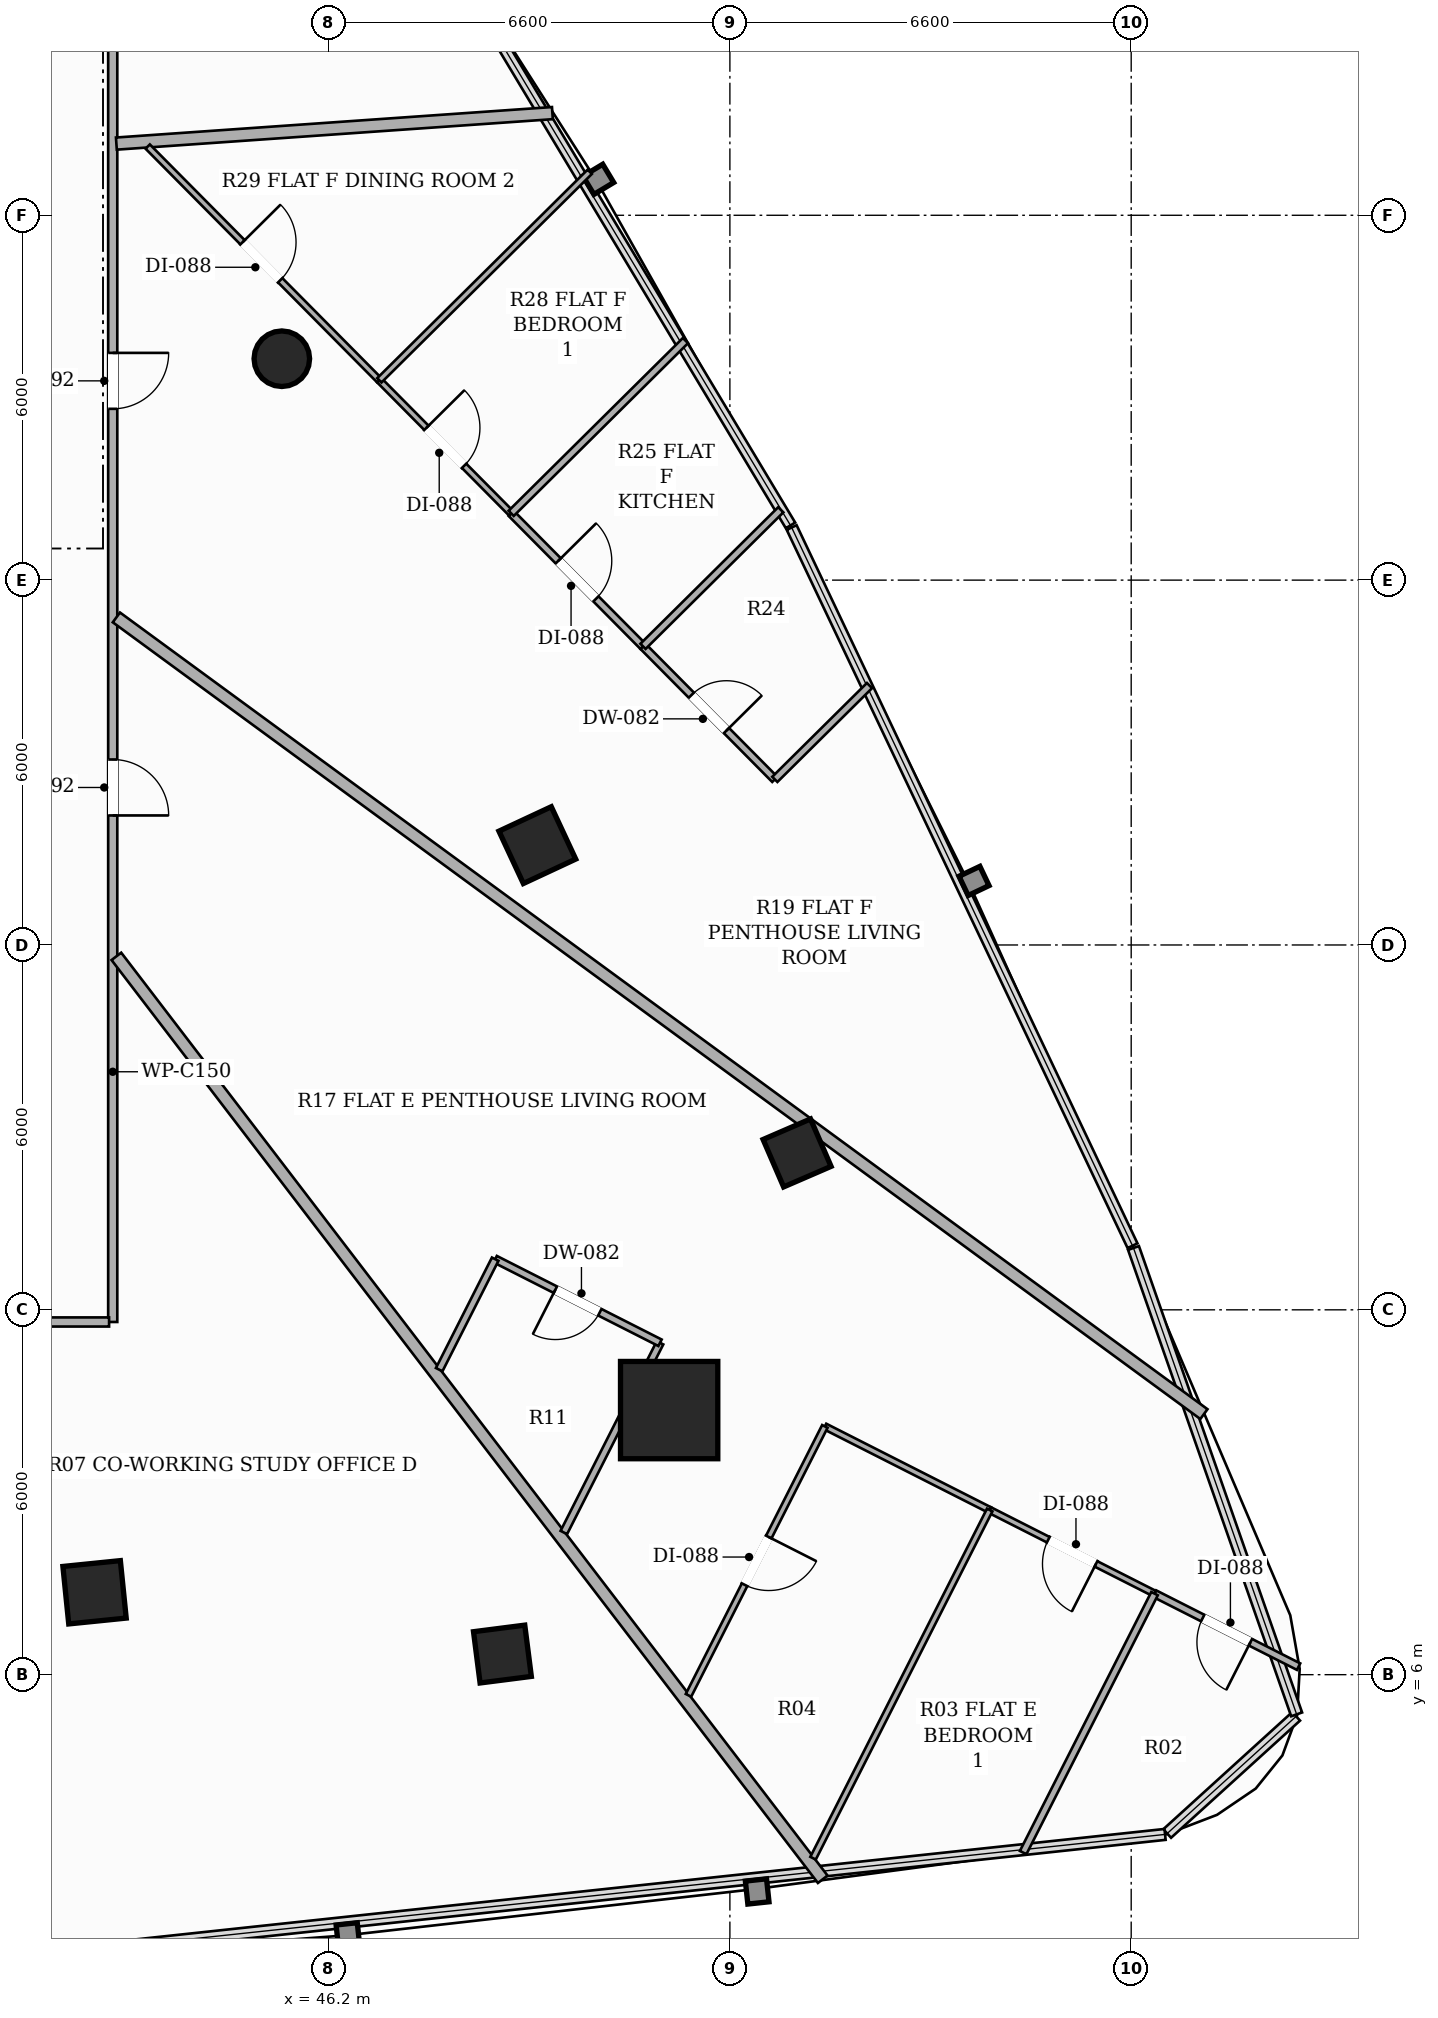
"""IFC4 building model, lengths in metres.
Left out: names, types, materials, properties, quantities, classifications, styles, units other than length and angle.
Written with IfcOpenShell. Run it as: python <this file> out.ifc"""

import sys

from ifc_helpers import new_model, si_unit, direction, frame, frame_2d, origin, origin_2d, place, context, subcontext, project, spatial, rectangle, hollow_rectangle, hollow_circle, extrude, element, fill, save


model = new_model("IFC4")
c1 = context("Model", 3, precision=1e-05, world=origin(), true_north=direction((0.0, 1.0)))
c2 = subcontext(c1, "Body", "Model", "MODEL_VIEW")
j1 = project(units=[si_unit("LENGTHUNIT", "METRE"), si_unit("PLANEANGLEUNIT", "RADIAN")], contexts=[c1])
p1 = place(None, origin())
s1 = spatial("IfcSite", under=j1, at=p1, CompositionType="ELEMENT")
p2 = place(p1, origin())
s2 = spatial("IfcBuilding", under=s1, at=p2, CompositionType="ELEMENT")
p3 = place(p2, frame((0.0, 0.0, 30.2)))
s3 = spatial("IfcBuildingStorey", under=s2, at=p3, CompositionType="ELEMENT", Elevation=30.2)
p4 = place(p3, frame((51.801, 10.351, 0.0), z_axis=(0.0, 0.0, 1.0), x_axis=(1.0, 0.0, 0.0)))
e1 = element("IfcColumn", 1, at=p4, inside=s3, PredefinedType="COLUMN", context=c2, shape_type="SweptSolid", body=[
    extrude(hollow_rectangle(XDim=1.6, YDim=1.6, WallThickness=0.05, at=origin_2d()), origin(), (0.0, 0.0, 1.0), 3.3),
])
for number, where, z_axis, x_axis in (
    (2, (42.351, 7.355, 0.0), (0.0, 0.0, 1.0), (0.995, 0.101, 0.0)),
    (3, (49.633, 19.642, 0.0), (0.0, 0.0, 1.0), (-0.423, 0.906, 0.0)),
):
    element("IfcColumn", number, at=place(p3, frame(where, z_axis=z_axis, x_axis=x_axis)), inside=s3, PredefinedType="COLUMN", context=c2, shape_type="SweptSolid", body=[
        extrude(hollow_rectangle(XDim=0.95, YDim=0.95, WallThickness=0.032, at=origin_2d()), origin(), (0.0, 0.0, 1.0), 3.3),
    ])
p5 = place(p3, frame((45.431, 27.641, 0.0), z_axis=(0.0, 0.0, 1.0), x_axis=(1.0, 0.0, 0.0)))
e4 = element("IfcColumn", 4, at=p5, inside=s3, PredefinedType="COLUMN", context=c2, shape_type="SweptSolid", body=[
    extrude(hollow_circle(Radius=0.457, WallThickness=0.025, at=origin_2d()), origin(), (0.0, 0.0, 1.0), 3.3),
])
for number, where, z_axis, x_axis in (
    (5, (49.059, 6.339, 0.0), (0.0, 0.0, 1.0), (0.992, 0.127, 0.0)),
    (6, (53.905, 14.58, 0.0), (0.0, 0.0, 1.0), (-0.397, 0.918, 0.0)),
):
    element("IfcColumn", number, at=place(p3, frame(where, z_axis=z_axis, x_axis=x_axis)), inside=s3, PredefinedType="COLUMN", context=c2, shape_type="SweptSolid", body=[
        extrude(hollow_rectangle(XDim=0.85, YDim=0.85, WallThickness=0.028, at=origin_2d()), origin(), (0.0, 0.0, 1.0), 3.3),
    ])
p6 = place(p3, frame((42.65, 36.84, 0.0), z_axis=(0.0, 0.0, 1.0), x_axis=(0.0, -1.0, 0.0)))
e7 = element("IfcWall", 7, at=p6, inside=s3, PredefinedType="PARTITIONING", context=c2, shape_type="SweptSolid", body=[
    extrude(rectangle(XDim=25.04, YDim=0.15, at=frame_2d((12.52, 0.0))), origin(), (0.0, 0.0, 1.0), 2.413),
])
p7 = place(p6, frame((2.543, 0.0, 0.0)))
e8 = element("IfcOpeningElement", 8, at=p7, cuts=e7, PredefinedType="OPENING", context=c2, shape_type="SweptSolid", body=[
    extrude(rectangle(XDim=0.88, YDim=2.1, at=frame_2d((0.44, 1.05))), frame((0.0, 0.085, 0.0), z_axis=(0.0, -1.0, 0.0), x_axis=(1.0, 0.0, 0.0)), (0.0, 0.0, 1.0), 0.17),
])
p8 = place(p6, frame((15.79, 0.0, 0.0)))
e9 = element("IfcOpeningElement", 9, at=p8, cuts=e7, PredefinedType="OPENING", context=c2, shape_type="SweptSolid", body=[
    extrude(rectangle(XDim=0.92, YDim=2.15, at=frame_2d((0.46, 1.075))), frame((0.0, 0.085, 0.0), z_axis=(0.0, -1.0, 0.0), x_axis=(1.0, 0.0, 0.0)), (0.0, 0.0, 1.0), 0.17),
])
p9 = place(p6, frame((9.103, 0.0, 0.0)))
e10 = element("IfcOpeningElement", 10, at=p9, cuts=e7, PredefinedType="OPENING", context=c2, shape_type="SweptSolid", body=[
    extrude(rectangle(XDim=0.92, YDim=2.15, at=frame_2d((0.46, 1.075))), frame((0.0, 0.085, 0.0), z_axis=(0.0, -1.0, 0.0), x_axis=(1.0, 0.0, 0.0)), (0.0, 0.0, 1.0), 0.17),
])
p10 = place(p3, frame((42.59, 11.8, 0.0), z_axis=(0.0, 0.0, 1.0), x_axis=(-1.0, 0.0, 0.0)))
e11 = element("IfcWall", 11, at=p10, inside=s3, PredefinedType="PARTITIONING", context=c2, shape_type="SweptSolid", body=[
    extrude(rectangle(XDim=19.24, YDim=0.15, at=frame_2d((9.62, 0.0))), origin(), (0.0, 0.0, 1.0), 2.669),
])
p11 = place(p10, frame((12.818, 0.0, 0.0)))
e12 = element("IfcOpeningElement", 12, at=p11, cuts=e11, PredefinedType="OPENING", context=c2, shape_type="SweptSolid", body=[
    extrude(rectangle(XDim=0.92, YDim=2.15, at=frame_2d((0.46, 1.075))), frame((0.0, 0.085, 0.0), z_axis=(0.0, -1.0, 0.0), x_axis=(1.0, 0.0, 0.0)), (0.0, 0.0, 1.0), 0.17),
])
p12 = place(p10, frame((3.519, 0.0, 0.0)))
e13 = element("IfcOpeningElement", 13, at=p12, cuts=e11, PredefinedType="OPENING", context=c2, shape_type="SweptSolid", body=[
    extrude(rectangle(XDim=0.88, YDim=2.1, at=frame_2d((0.44, 1.05))), frame((0.0, 0.085, 0.0), z_axis=(0.0, -1.0, 0.0), x_axis=(1.0, 0.0, 0.0)), (0.0, 0.0, 1.0), 0.17),
])
p13 = place(p3, frame((49.881, 31.68, 0.0), z_axis=(0.0, 0.0, 1.0), x_axis=(-0.997568680722, -0.069690223431, 0.0)))
e14 = element("IfcWall", 14, at=p13, inside=s3, PredefinedType="PARTITIONING", context=c2, shape_type="SweptSolid", body=[
    extrude(rectangle(XDim=7.189, YDim=0.2, at=frame_2d((3.594, 0.0))), origin(), (0.0, 0.0, 1.0), 2.413),
])
p14 = place(p3, frame((42.71, 17.813, 0.0), z_axis=(0.0, 0.0, 1.0), x_axis=(0.607788570878, -0.794098893784, 0.0)))
e15 = element("IfcWall", 15, at=p14, inside=s3, PredefinedType="PARTITIONING", context=c2, shape_type="SweptSolid", body=[
    extrude(rectangle(XDim=19.114, YDim=0.2, at=frame_2d((9.557, 0.0))), origin(), (0.0, 0.0, 1.0), 2.413),
])
p15 = place(p3, frame((42.71, 23.387, 0.0), z_axis=(0.0, 0.0, 1.0), x_axis=(0.806713303584, -0.590943014021, 0.0)))
e16 = element("IfcWall", 16, at=p15, inside=s3, PredefinedType="PARTITIONING", context=c2, shape_type="SweptSolid", body=[
    extrude(rectangle(XDim=22.171, YDim=0.2, at=frame_2d((11.086, 0.0))), origin(), (0.0, 0.0, 1.0), 2.413),
])
p16 = place(p3, frame((50.069, 8.338, 0.0), z_axis=(0.0, 0.0, 1.0), x_axis=(0.45217581214, 0.891928828391, 0.0)))
e17 = element("IfcWall", 17, at=p16, inside=s3, PredefinedType="PARTITIONING", context=c2, shape_type="SweptSolid", body=[
    extrude(rectangle(XDim=3.498, YDim=0.12, at=frame_2d((1.749, 0.0))), origin(), (0.0, 0.0, 1.0), 2.413),
])
p17 = place(p3, frame((51.651, 11.458, 0.0), z_axis=(0.0, 0.0, 1.0), x_axis=(-0.891842269509, 0.452346511336, 0.0)))
e18 = element("IfcWall", 18, at=p17, inside=s3, PredefinedType="PARTITIONING", context=c2, shape_type="SweptSolid", body=[
    extrude(rectangle(XDim=3.04, YDim=0.12, at=frame_2d((1.52, 0.0))), origin(), (0.0, 0.0, 1.0), 2.413),
])
p18 = place(p17, frame((1.11, 0.0, 0.0)))
e19 = element("IfcOpeningElement", 19, at=p18, cuts=e18, PredefinedType="OPENING", context=c2, shape_type="SweptSolid", body=[
    extrude(rectangle(XDim=0.82, YDim=2.1, at=frame_2d((0.41, 1.05))), frame((0.0, 0.07, 0.0), z_axis=(0.0, -1.0, 0.0), x_axis=(1.0, 0.0, 0.0)), (0.0, 0.0, 1.0), 0.14),
])
p19 = place(p3, frame((48.94, 12.833, 0.0), z_axis=(0.0, 0.0, 1.0), x_axis=(-0.452097038501, -0.891968759418, 0.0)))
e20 = element("IfcWall", 20, at=p19, inside=s3, PredefinedType="PARTITIONING", context=c2, shape_type="SweptSolid", body=[
    extrude(rectangle(XDim=2.037, YDim=0.12, at=frame_2d((1.019, 0.0))), origin(), (0.0, 0.0, 1.0), 3.06),
])
p20 = place(p3, frame((62.153, 6.132, 0.0), z_axis=(0.0, 0.0, 1.0), x_axis=(-0.891950280654, 0.452133494491, 0.0)))
e21 = element("IfcWall", 21, at=p20, inside=s3, PredefinedType="PARTITIONING", context=c2, shape_type="SweptSolid", body=[
    extrude(rectangle(XDim=2.656, YDim=0.12, at=frame_2d((1.328, 0.0))), origin(), (0.0, 0.0, 1.0), 3.06),
])
p21 = place(p20, frame((0.888, 0.0, 0.0)))
e22 = element("IfcOpeningElement", 22, at=p21, cuts=e21, PredefinedType="OPENING", context=c2, shape_type="SweptSolid", body=[
    extrude(rectangle(XDim=0.88, YDim=2.1, at=frame_2d((0.44, 1.05))), frame((0.0, 0.07, 0.0), z_axis=(0.0, -1.0, 0.0), x_axis=(1.0, 0.0, 0.0)), (0.0, 0.0, 1.0), 0.14),
])
p22 = place(p3, frame((59.784, 7.333, 0.0), z_axis=(0.0, 0.0, 1.0), x_axis=(-0.891842269509, 0.452346511336, 0.0)))
e23 = element("IfcWall", 23, at=p22, inside=s3, PredefinedType="PARTITIONING", context=c2, shape_type="SweptSolid", body=[
    extrude(rectangle(XDim=3.04, YDim=0.1, at=frame_2d((1.52, 0.0))), origin(), (0.0, 0.0, 1.0), 3.06),
])
p23 = place(p22, frame((1.08, 0.0, 0.0)))
e24 = element("IfcOpeningElement", 24, at=p23, cuts=e23, PredefinedType="OPENING", context=c2, shape_type="SweptSolid", body=[
    extrude(rectangle(XDim=0.88, YDim=2.1, at=frame_2d((0.44, 1.05))), frame((0.0, 0.06, 0.0), z_axis=(0.0, -1.0, 0.0), x_axis=(1.0, 0.0, 0.0)), (0.0, 0.0, 1.0), 0.12),
])
p24 = place(p3, frame((57.073, 8.708, 0.0), z_axis=(0.0, 0.0, 1.0), x_axis=(-0.891842269509, 0.452346511336, 0.0)))
e25 = element("IfcWall", 25, at=p24, inside=s3, PredefinedType="PARTITIONING", context=c2, shape_type="SweptSolid", body=[
    extrude(rectangle(XDim=3.04, YDim=0.1, at=frame_2d((1.52, 0.0))), origin(), (0.0, 0.0, 1.0), 2.619),
])
p25 = place(p3, frame((54.362, 10.083, 0.0), z_axis=(0.0, 0.0, 1.0), x_axis=(-0.452306340277, -0.891862643317, 0.0)))
e26 = element("IfcWall", 26, at=p25, inside=s3, PredefinedType="PARTITIONING", context=c2, shape_type="SweptSolid", body=[
    extrude(rectangle(XDim=4.959, YDim=0.1, at=frame_2d((2.48, 0.0))), origin(), (0.0, 0.0, 1.0), 3.06),
])
p26 = place(p25, frame((2.04, 0.0, 0.0)))
e27 = element("IfcOpeningElement", 27, at=p26, cuts=e26, PredefinedType="OPENING", context=c2, shape_type="SweptSolid", body=[
    extrude(rectangle(XDim=0.88, YDim=2.1, at=frame_2d((0.44, 1.05))), frame((0.0, 0.06, 0.0), z_axis=(0.0, -1.0, 0.0), x_axis=(1.0, 0.0, 0.0)), (0.0, 0.0, 1.0), 0.12),
])
p27 = place(p3, frame((57.623, 3.074, 0.0), z_axis=(0.0, 0.0, 1.0), x_axis=(0.452460987707, 0.891784197328, 0.0)))
e28 = element("IfcWall", 28, at=p27, inside=s3, PredefinedType="PARTITIONING", context=c2, shape_type="SweptSolid", body=[
    extrude(rectangle(XDim=4.776, YDim=0.12, at=frame_2d((2.388, 0.0))), origin(), (0.0, 0.0, 1.0), 3.06),
])
p28 = place(p3, frame((54.168, 2.982, 0.0), z_axis=(0.0, 0.0, 1.0), x_axis=(0.452437935158, 0.891795893033, 0.0)))
e29 = element("IfcWall", 29, at=p28, inside=s3, PredefinedType="PARTITIONING", context=c2, shape_type="SweptSolid", body=[
    extrude(rectangle(XDim=6.421, YDim=0.1, at=frame_2d((3.21, 0.0))), origin(), (0.0, 0.0, 1.0), 2.619),
])
p29 = place(p3, frame((51.371, 22.911, 0.0), z_axis=(0.0, 0.0, 1.0), x_axis=(0.703849557614, -0.710349069294, 0.0)))
e30 = element("IfcWall", 30, at=p29, inside=s3, PredefinedType="PARTITIONING", context=c2, shape_type="SweptSolid", body=[
    extrude(rectangle(XDim=3.08, YDim=0.12, at=frame_2d((1.54, 0.0))), origin(), (0.0, 0.0, 1.0), 3.06),
])
p30 = place(p29, frame((1.13, 0.0, 0.0)))
e31 = element("IfcOpeningElement", 31, at=p30, cuts=e30, PredefinedType="OPENING", context=c2, shape_type="SweptSolid", body=[
    extrude(rectangle(XDim=0.82, YDim=2.1, at=frame_2d((0.41, 1.05))), frame((0.0, 0.07, 0.0), z_axis=(0.0, -1.0, 0.0), x_axis=(1.0, 0.0, 0.0)), (0.0, 0.0, 1.0), 0.14),
])
p31 = place(p3, frame((53.539, 20.723, 0.0), z_axis=(0.0, 0.0, 1.0), x_axis=(0.710218316827, 0.703981492969, 0.0)))
e32 = element("IfcWall", 32, at=p31, inside=s3, PredefinedType="PARTITIONING", context=c2, shape_type="SweptSolid", body=[
    extrude(rectangle(XDim=2.192, YDim=0.12, at=frame_2d((1.096, 0.0))), origin(), (0.0, 0.0, 1.0), 3.06),
])
p32 = place(p3, frame((49.203, 25.098, 0.0), z_axis=(0.0, 0.0, 1.0), x_axis=(0.704048077172, -0.710152311149, 0.0)))
e33 = element("IfcWall", 33, at=p32, inside=s3, PredefinedType="PARTITIONING", context=c2, shape_type="SweptSolid", body=[
    extrude(rectangle(XDim=3.08, YDim=0.12, at=frame_2d((1.54, 0.0))), origin(), (0.0, 0.0, 1.0), 3.06),
])
p33 = place(p32, frame((1.1, 0.0, 0.0)))
e34 = element("IfcOpeningElement", 34, at=p33, cuts=e33, PredefinedType="OPENING", context=c2, shape_type="SweptSolid", body=[
    extrude(rectangle(XDim=0.88, YDim=2.1, at=frame_2d((0.44, 1.05))), frame((0.0, 0.07, 0.0), z_axis=(0.0, -1.0, 0.0), x_axis=(1.0, 0.0, 0.0)), (0.0, 0.0, 1.0), 0.14),
])
p34 = place(p3, frame((47.035, 27.286, 0.0), z_axis=(0.0, 0.0, 1.0), x_axis=(0.703849557614, -0.710349069294, 0.0)))
e35 = element("IfcWall", 35, at=p34, inside=s3, PredefinedType="PARTITIONING", context=c2, shape_type="SweptSolid", body=[
    extrude(rectangle(XDim=3.08, YDim=0.1, at=frame_2d((1.54, 0.0))), origin(), (0.0, 0.0, 1.0), 3.06),
])
p35 = place(p34, frame((1.1, 0.0, 0.0)))
e36 = element("IfcOpeningElement", 36, at=p35, cuts=e35, PredefinedType="OPENING", context=c2, shape_type="SweptSolid", body=[
    extrude(rectangle(XDim=0.88, YDim=2.1, at=frame_2d((0.44, 1.05))), frame((0.0, 0.06, 0.0), z_axis=(0.0, -1.0, 0.0), x_axis=(1.0, 0.0, 0.0)), (0.0, 0.0, 1.0), 0.12),
])
p36 = place(p3, frame((43.225, 31.13, 0.0), z_axis=(0.0, 0.0, 1.0), x_axis=(0.703942028385, -0.710257432677, 0.0)))
e37 = element("IfcWall", 37, at=p36, inside=s3, PredefinedType="PARTITIONING", context=c2, shape_type="SweptSolid", body=[
    extrude(rectangle(XDim=5.412, YDim=0.1, at=frame_2d((2.706, 0.0))), origin(), (0.0, 0.0, 1.0), 2.413),
])
p37 = place(p36, frame((2.216, 0.0, 0.0)))
e38 = element("IfcOpeningElement", 38, at=p37, cuts=e37, PredefinedType="OPENING", context=c2, shape_type="SweptSolid", body=[
    extrude(rectangle(XDim=0.88, YDim=2.1, at=frame_2d((0.44, 1.05))), frame((0.0, 0.06, 0.0), z_axis=(0.0, -1.0, 0.0), x_axis=(1.0, 0.0, 0.0)), (0.0, 0.0, 1.0), 0.12),
])
p38 = place(p3, frame((51.371, 22.911, 0.0), z_axis=(0.0, 0.0, 1.0), x_axis=(0.710199123854, 0.704000855452, 0.0)))
e39 = element("IfcWall", 39, at=p38, inside=s3, PredefinedType="PARTITIONING", context=c2, shape_type="SweptSolid", body=[
    extrude(rectangle(XDim=3.19, YDim=0.12, at=frame_2d((1.595, 0.0))), origin(), (0.0, 0.0, 1.0), 3.06),
])
p39 = place(p3, frame((49.203, 25.098, 0.0), z_axis=(0.0, 0.0, 1.0), x_axis=(0.710215428297, 0.703984407078, 0.0)))
e40 = element("IfcWall", 40, at=p39, inside=s3, PredefinedType="PARTITIONING", context=c2, shape_type="SweptSolid", body=[
    extrude(rectangle(XDim=4.036, YDim=0.12, at=frame_2d((2.018, 0.0))), origin(), (0.0, 0.0, 1.0), 3.06),
])
p40 = place(p3, frame((47.035, 27.286, 0.0), z_axis=(0.0, 0.0, 1.0), x_axis=(0.71028193183, 0.703917308578, 0.0)))
e41 = element("IfcWall", 41, at=p40, inside=s3, PredefinedType="PARTITIONING", context=c2, shape_type="SweptSolid", body=[
    extrude(rectangle(XDim=4.872, YDim=0.1, at=frame_2d((2.436, 0.0))), origin(), (0.0, 0.0, 1.0), 3.06),
])
p41 = place(p8, origin())
e42 = element("IfcDoor", 42, at=p41, inside=s3, OperationType="SINGLE_SWING_RIGHT", PredefinedType="DOOR", context=c2, shape_type="SweptSolid", body=[
    extrude(rectangle(XDim=0.92, YDim=2.15, at=frame_2d((0.46, 1.075))), frame((0.0, 0.025, 0.0), z_axis=(0.0, -1.0, 0.0), x_axis=(1.0, 0.0, 0.0)), (0.0, 0.0, 1.0), 0.05),
])
fill(e9, e42)
p42 = place(p18, origin())
e43 = element("IfcDoor", 43, at=p42, inside=s3, OperationType="SINGLE_SWING_RIGHT", PredefinedType="DOOR", context=c2, shape_type="SweptSolid", body=[
    extrude(rectangle(XDim=0.82, YDim=2.1, at=frame_2d((0.41, 1.05))), frame((0.0, 0.025, 0.0), z_axis=(0.0, -1.0, 0.0), x_axis=(1.0, 0.0, 0.0)), (0.0, 0.0, 1.0), 0.05),
])
fill(e19, e43)
p43 = place(p21, origin())
e44 = element("IfcDoor", 44, at=p43, inside=s3, OperationType="SINGLE_SWING_LEFT", PredefinedType="DOOR", context=c2, shape_type="SweptSolid", body=[
    extrude(rectangle(XDim=0.88, YDim=2.1, at=frame_2d((0.44, 1.05))), frame((0.0, 0.025, 0.0), z_axis=(0.0, -1.0, 0.0), x_axis=(1.0, 0.0, 0.0)), (0.0, 0.0, 1.0), 0.05),
])
fill(e22, e44)
p44 = place(p23, origin())
e45 = element("IfcDoor", 45, at=p44, inside=s3, OperationType="SINGLE_SWING_LEFT", PredefinedType="DOOR", context=c2, shape_type="SweptSolid", body=[
    extrude(rectangle(XDim=0.88, YDim=2.1, at=frame_2d((0.44, 1.05))), frame((0.0, 0.025, 0.0), z_axis=(0.0, -1.0, 0.0), x_axis=(1.0, 0.0, 0.0)), (0.0, 0.0, 1.0), 0.05),
])
fill(e24, e45)
p45 = place(p26, origin())
e46 = element("IfcDoor", 46, at=p45, inside=s3, OperationType="SINGLE_SWING_LEFT", PredefinedType="DOOR", context=c2, shape_type="SweptSolid", body=[
    extrude(rectangle(XDim=0.88, YDim=2.1, at=frame_2d((0.44, 1.05))), frame((0.0, 0.025, 0.0), z_axis=(0.0, -1.0, 0.0), x_axis=(1.0, 0.0, 0.0)), (0.0, 0.0, 1.0), 0.05),
])
fill(e27, e46)
p46 = place(p9, origin())
e47 = element("IfcDoor", 47, at=p46, inside=s3, OperationType="SINGLE_SWING_LEFT", PredefinedType="DOOR", context=c2, shape_type="SweptSolid", body=[
    extrude(rectangle(XDim=0.92, YDim=2.15, at=frame_2d((0.46, 1.075))), frame((0.0, 0.025, 0.0), z_axis=(0.0, -1.0, 0.0), x_axis=(1.0, 0.0, 0.0)), (0.0, 0.0, 1.0), 0.05),
])
fill(e10, e47)
p47 = place(p30, origin())
e48 = element("IfcDoor", 48, at=p47, inside=s3, OperationType="SINGLE_SWING_RIGHT", PredefinedType="DOOR", context=c2, shape_type="SweptSolid", body=[
    extrude(rectangle(XDim=0.82, YDim=2.1, at=frame_2d((0.41, 1.05))), frame((0.0, 0.025, 0.0), z_axis=(0.0, -1.0, 0.0), x_axis=(1.0, 0.0, 0.0)), (0.0, 0.0, 1.0), 0.05),
])
fill(e31, e48)
p48 = place(p33, origin())
e49 = element("IfcDoor", 49, at=p48, inside=s3, OperationType="SINGLE_SWING_LEFT", PredefinedType="DOOR", context=c2, shape_type="SweptSolid", body=[
    extrude(rectangle(XDim=0.88, YDim=2.1, at=frame_2d((0.44, 1.05))), frame((0.0, 0.025, 0.0), z_axis=(0.0, -1.0, 0.0), x_axis=(1.0, 0.0, 0.0)), (0.0, 0.0, 1.0), 0.05),
])
fill(e34, e49)
p49 = place(p35, origin())
e50 = element("IfcDoor", 50, at=p49, inside=s3, OperationType="SINGLE_SWING_LEFT", PredefinedType="DOOR", context=c2, shape_type="SweptSolid", body=[
    extrude(rectangle(XDim=0.88, YDim=2.1, at=frame_2d((0.44, 1.05))), frame((0.0, 0.025, 0.0), z_axis=(0.0, -1.0, 0.0), x_axis=(1.0, 0.0, 0.0)), (0.0, 0.0, 1.0), 0.05),
])
fill(e36, e50)
p50 = place(p37, origin())
e51 = element("IfcDoor", 51, at=p50, inside=s3, OperationType="SINGLE_SWING_LEFT", PredefinedType="DOOR", context=c2, shape_type="SweptSolid", body=[
    extrude(rectangle(XDim=0.88, YDim=2.1, at=frame_2d((0.44, 1.05))), frame((0.0, 0.025, 0.0), z_axis=(0.0, -1.0, 0.0), x_axis=(1.0, 0.0, 0.0)), (0.0, 0.0, 1.0), 0.05),
])
fill(e38, e51)
save(model, sys.argv[1])
